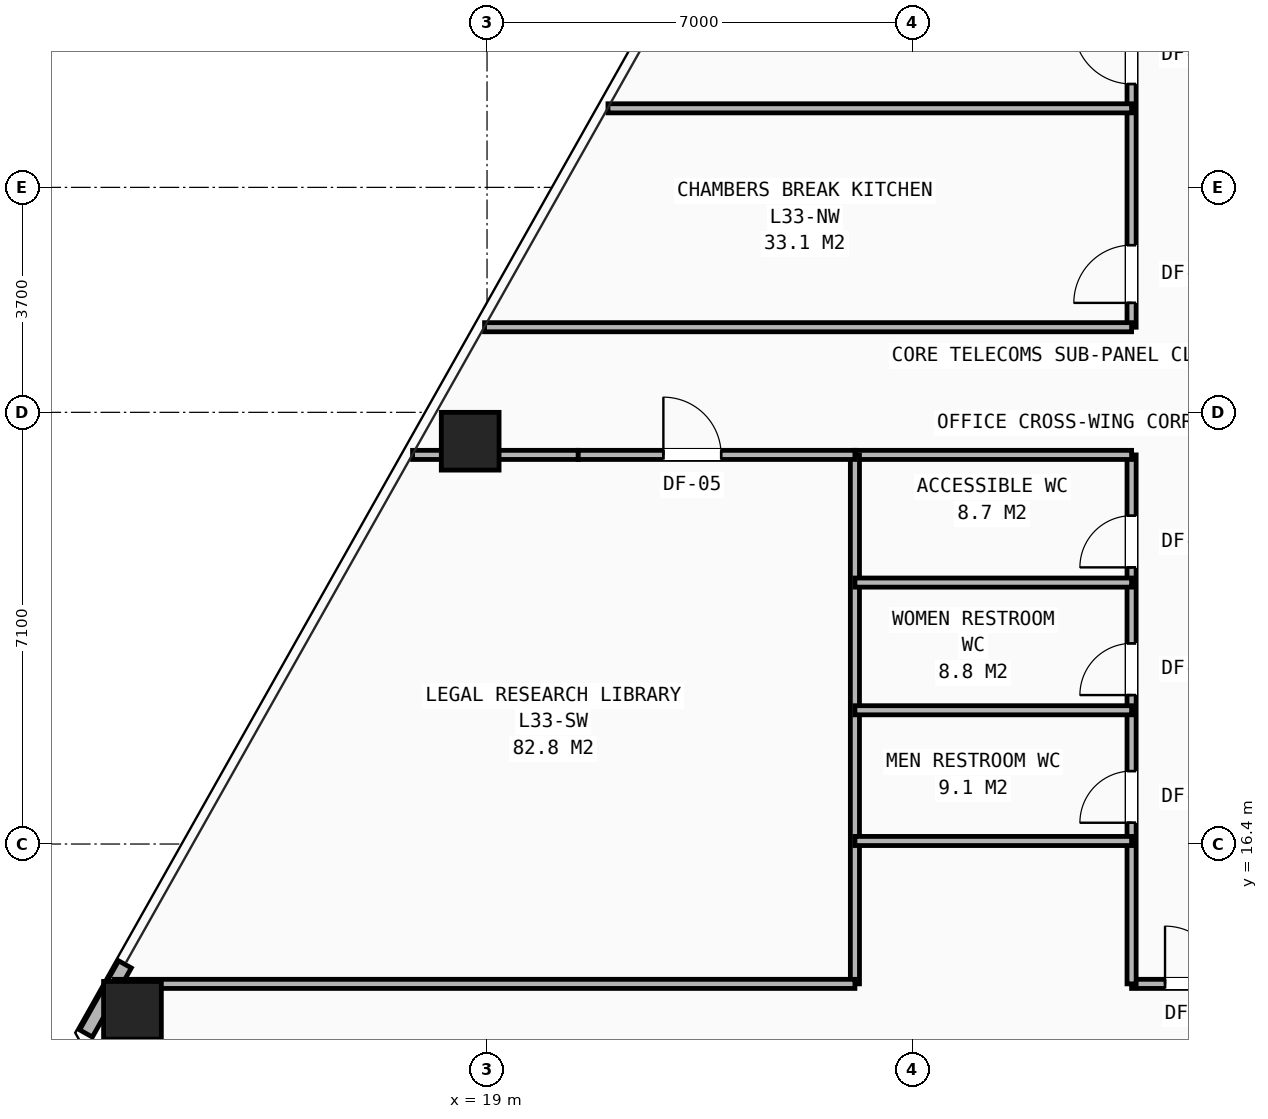
"""IFC4 building model, lengths in metres.
Left out: names, types, materials, properties, quantities, classifications, styles, units other than length and angle.
Written with IfcOpenShell. Run it as: python <this file> out.ifc"""

import sys

from ifc_helpers import new_model, si_unit, direction, frame, frame_2d, origin, origin_2d, place, context, subcontext, project, spatial, rectangle, hollow_rectangle, extrude, element, fill, save


model = new_model("IFC4")
c1 = context("Model", 3, precision=1e-05, world=origin(), true_north=direction((0.0, 1.0)))
c2 = subcontext(c1, "Body", "Model", "MODEL_VIEW")
j1 = project(units=[si_unit("LENGTHUNIT", "METRE"), si_unit("PLANEANGLEUNIT", "RADIAN")], contexts=[c1])
p1 = place(None, origin())
s1 = spatial("IfcSite", under=j1, at=p1, CompositionType="ELEMENT")
p2 = place(p1, origin())
s2 = spatial("IfcBuilding", under=s1, at=p2, CompositionType="ELEMENT")
p3 = place(p2, frame((0.0, 0.0, 116.0)))
s3 = spatial("IfcBuildingStorey", under=s2, at=p3, CompositionType="ELEMENT", Elevation=116.0)
for number, where, z_axis, x_axis in (
    (1, (18.723, 23.025, 0.0), (0.0, 0.0, 1.0), (1.0, 0.0, 0.0)),
    (2, (13.169, 13.665, 0.0), (0.0, 0.0, 1.0), (1.0, 0.0, 0.0)),
):
    element("IfcColumn", number, at=place(p3, frame(where, z_axis=z_axis, x_axis=x_axis)), inside=s3, PredefinedType="COLUMN", context=c2, shape_type="SweptSolid", body=[
        extrude(hollow_rectangle(XDim=0.95, YDim=0.95, WallThickness=0.065, at=origin_2d()), origin(), (0.0, 0.0, 1.0), 3.45),
    ])
p4 = place(p3, frame((13.045, 14.421, 0.0), z_axis=(0.0, 0.0, 1.0), x_axis=(-0.4912738615, -0.871005162446, 0.0)))
e3 = element("IfcWall", 3, at=p4, inside=s3, PredefinedType="SHEAR", context=c2, shape_type="SweptSolid", body=[
    extrude(rectangle(XDim=1.304, YDim=0.24, at=frame_2d((0.652, 0.0))), origin(), (0.0, 0.0, 1.0), 2.583),
])
p5 = place(p3, frame((29.6, 14.1, 0.0), z_axis=(0.0, 0.0, 1.0), x_axis=(1.0, 0.0, 0.0)))
e4 = element("IfcWall", 4, at=p5, inside=s3, PredefinedType="PARTITIONING", context=c2, shape_type="SweptSolid", body=[
    extrude(rectangle(XDim=18.6, YDim=0.15, at=frame_2d((9.3, 0.0))), origin(), (0.0, 0.0, 1.0), 2.225),
])
p6 = place(p5, frame((0.55, 0.0, 0.0)))
e5 = element("IfcOpeningElement", 5, at=p6, cuts=e4, PredefinedType="OPENING", context=c2, shape_type="SweptSolid", body=[
    extrude(rectangle(XDim=0.95, YDim=2.1, at=frame_2d((0.475, 1.05))), frame((0.0, 0.085, 0.0), z_axis=(0.0, -1.0, 0.0), x_axis=(1.0, 0.0, 0.0)), (0.0, 0.0, 1.0), 0.17),
])
p7 = place(p5, frame((3.95, 0.0, 0.0)))
e6 = element("IfcOpeningElement", 6, at=p7, cuts=e4, PredefinedType="OPENING", context=c2, shape_type="SweptSolid", body=[
    extrude(rectangle(XDim=0.95, YDim=2.1, at=frame_2d((0.475, 1.05))), frame((0.0, 0.085, 0.0), z_axis=(0.0, -1.0, 0.0), x_axis=(1.0, 0.0, 0.0)), (0.0, 0.0, 1.0), 0.17),
])
p8 = place(p5, frame((8.55, 0.0, 0.0)))
e7 = element("IfcOpeningElement", 7, at=p8, cuts=e4, PredefinedType="OPENING", context=c2, shape_type="SweptSolid", body=[
    extrude(rectangle(XDim=0.95, YDim=2.1, at=frame_2d((0.475, 1.05))), frame((0.0, 0.085, 0.0), z_axis=(0.0, -1.0, 0.0), x_axis=(1.0, 0.0, 0.0)), (0.0, 0.0, 1.0), 0.17),
])
p9 = place(p5, frame((13.35, 0.0, 0.0)))
e8 = element("IfcOpeningElement", 8, at=p9, cuts=e4, PredefinedType="OPENING", context=c2, shape_type="SweptSolid", body=[
    extrude(rectangle(XDim=0.95, YDim=2.1, at=frame_2d((0.475, 1.05))), frame((0.0, 0.085, 0.0), z_axis=(0.0, -1.0, 0.0), x_axis=(1.0, 0.0, 0.0)), (0.0, 0.0, 1.0), 0.17),
])
p10 = place(p3, frame((29.6, 14.1, 0.0), z_axis=(0.0, 0.0, 1.0), x_axis=(0.0, 1.0, 0.0)))
e9 = element("IfcWall", 9, at=p10, inside=s3, PredefinedType="PARTITIONING", context=c2, shape_type="SweptSolid", body=[
    extrude(rectangle(XDim=8.7, YDim=0.15, at=frame_2d((4.35, 0.0))), origin(), (0.0, 0.0, 1.0), 3.21),
])
p11 = place(p10, frame((2.65, 0.0, 0.0)))
e10 = element("IfcOpeningElement", 10, at=p11, cuts=e9, PredefinedType="OPENING", context=c2, shape_type="SweptSolid", body=[
    extrude(rectangle(XDim=0.85, YDim=2.05, at=frame_2d((0.425, 1.025))), frame((0.0, 0.085, 0.0), z_axis=(0.0, -1.0, 0.0), x_axis=(1.0, 0.0, 0.0)), (0.0, 0.0, 1.0), 0.17),
])
p12 = place(p10, frame((4.75, 0.0, 0.0)))
e11 = element("IfcOpeningElement", 11, at=p12, cuts=e9, PredefinedType="OPENING", context=c2, shape_type="SweptSolid", body=[
    extrude(rectangle(XDim=0.85, YDim=2.05, at=frame_2d((0.425, 1.025))), frame((0.0, 0.085, 0.0), z_axis=(0.0, -1.0, 0.0), x_axis=(1.0, 0.0, 0.0)), (0.0, 0.0, 1.0), 0.17),
])
p13 = place(p10, frame((6.85, 0.0, 0.0)))
e12 = element("IfcOpeningElement", 12, at=p13, cuts=e9, PredefinedType="OPENING", context=c2, shape_type="SweptSolid", body=[
    extrude(rectangle(XDim=0.85, YDim=2.05, at=frame_2d((0.425, 1.025))), frame((0.0, 0.085, 0.0), z_axis=(0.0, -1.0, 0.0), x_axis=(1.0, 0.0, 0.0)), (0.0, 0.0, 1.0), 0.17),
])
p14 = place(p3, frame((29.6, 24.9, 0.0), z_axis=(0.0, 0.0, 1.0), x_axis=(0.0, 1.0, 0.0)))
e13 = element("IfcWall", 13, at=p14, inside=s3, PredefinedType="PARTITIONING", context=c2, shape_type="SweptSolid", body=[
    extrude(rectangle(XDim=13.9, YDim=0.15, at=frame_2d((6.95, 0.0))), origin(), (0.0, 0.0, 1.0), 2.225),
])
p15 = place(p14, frame((0.4, 0.0, 0.0)))
e14 = element("IfcOpeningElement", 14, at=p15, cuts=e13, PredefinedType="OPENING", context=c2, shape_type="SweptSolid", body=[
    extrude(rectangle(XDim=0.95, YDim=2.1, at=frame_2d((0.475, 1.05))), frame((0.0, 0.085, 0.0), z_axis=(0.0, -1.0, 0.0), x_axis=(1.0, 0.0, 0.0)), (0.0, 0.0, 1.0), 0.17),
])
p16 = place(p14, frame((4.0, 0.0, 0.0)))
e15 = element("IfcOpeningElement", 15, at=p16, cuts=e13, PredefinedType="OPENING", context=c2, shape_type="SweptSolid", body=[
    extrude(rectangle(XDim=0.95, YDim=2.1, at=frame_2d((0.475, 1.05))), frame((0.0, 0.085, 0.0), z_axis=(0.0, -1.0, 0.0), x_axis=(1.0, 0.0, 0.0)), (0.0, 0.0, 1.0), 0.17),
])
p17 = place(p14, frame((9.5, 0.0, 0.0)))
e16 = element("IfcOpeningElement", 16, at=p17, cuts=e13, PredefinedType="OPENING", context=c2, shape_type="SweptSolid", body=[
    extrude(rectangle(XDim=0.95, YDim=2.1, at=frame_2d((0.475, 1.05))), frame((0.0, 0.085, 0.0), z_axis=(0.0, -1.0, 0.0), x_axis=(1.0, 0.0, 0.0)), (0.0, 0.0, 1.0), 0.17),
])
p18 = place(p3, frame((17.775, 22.8, 0.0), z_axis=(0.0, 0.0, 1.0), x_axis=(1.0, 0.0, 0.0)))
e17 = element("IfcWall", 17, at=p18, inside=s3, PredefinedType="PARTITIONING", context=c2, shape_type="SweptSolid", body=[
    extrude(rectangle(XDim=2.725, YDim=0.15, at=frame_2d((1.362, 0.0))), origin(), (0.0, 0.0, 1.0), 2.589),
])
p19 = place(p3, frame((25.05, 22.8, 0.0), z_axis=(0.0, 0.0, 1.0), x_axis=(1.0, 0.0, 0.0)))
e18 = element("IfcWall", 18, at=p19, inside=s3, PredefinedType="PARTITIONING", context=c2, shape_type="SweptSolid", body=[
    extrude(rectangle(XDim=4.55, YDim=0.15, at=frame_2d((2.275, 0.0))), origin(), (0.0, 0.0, 1.0), 3.21),
])
p20 = place(p3, frame((18.959, 24.9, 0.0), z_axis=(0.0, 0.0, 1.0), x_axis=(1.0, 0.0, 0.0)))
e19 = element("IfcWall", 19, at=p20, inside=s3, PredefinedType="PARTITIONING", context=c2, shape_type="SweptSolid", body=[
    extrude(rectangle(XDim=10.641, YDim=0.15, at=frame_2d((5.32, 0.0))), origin(), (0.0, 0.0, 1.0), 2.589),
])
p21 = place(p3, frame((25.05, 14.1, 0.0), z_axis=(0.0, 0.0, 1.0), x_axis=(0.0, 1.0, 0.0)))
e20 = element("IfcWall", 20, at=p21, inside=s3, PredefinedType="PARTITIONING", context=c2, shape_type="SweptSolid", body=[
    extrude(rectangle(XDim=8.7, YDim=0.15, at=frame_2d((4.35, 0.0))), origin(), (0.0, 0.0, 1.0), 3.21),
])
for number, where, z_axis, x_axis in (
    (21, (25.05, 16.45, 0.0), (0.0, 0.0, 1.0), (1.0, 0.0, 0.0)),
    (22, (25.05, 18.6, 0.0), (0.0, 0.0, 1.0), (1.0, 0.0, 0.0)),
    (23, (25.05, 20.7, 0.0), (0.0, 0.0, 1.0), (1.0, 0.0, 0.0)),
):
    element("IfcWall", number, at=place(p3, frame(where, z_axis=z_axis, x_axis=x_axis)), inside=s3, PredefinedType="PARTITIONING", context=c2, shape_type="SweptSolid", body=[
        extrude(rectangle(XDim=4.55, YDim=0.15, at=frame_2d((2.275, 0.0))), origin(), (0.0, 0.0, 1.0), 3.21),
    ])
p22 = place(p3, frame((12.87, 14.1, 0.0), z_axis=(0.0, 0.0, 1.0), x_axis=(1.0, 0.0, 0.0)))
e24 = element("IfcWall", 24, at=p22, inside=s3, PredefinedType="PARTITIONING", context=c2, shape_type="SweptSolid", body=[
    extrude(rectangle(XDim=12.18, YDim=0.15, at=frame_2d((6.09, 0.0))), origin(), (0.0, 0.0, 1.0), 2.225),
])
p23 = place(p3, frame((20.5, 22.8, 0.0), z_axis=(0.0, 0.0, 1.0), x_axis=(1.0, 0.0, 0.0)))
e25 = element("IfcWall", 25, at=p23, inside=s3, PredefinedType="PARTITIONING", context=c2, shape_type="SweptSolid", body=[
    extrude(rectangle(XDim=4.55, YDim=0.15, at=frame_2d((2.275, 0.0))), origin(), (0.0, 0.0, 1.0), 3.21),
])
p24 = place(p23, frame((1.4, 0.0, 0.0)))
e26 = element("IfcOpeningElement", 26, at=p24, cuts=e25, PredefinedType="OPENING", context=c2, shape_type="SweptSolid", body=[
    extrude(rectangle(XDim=0.95, YDim=2.1, at=frame_2d((0.475, 1.05))), frame((0.0, 0.085, 0.0), z_axis=(0.0, -1.0, 0.0), x_axis=(1.0, 0.0, 0.0)), (0.0, 0.0, 1.0), 0.17),
])
p25 = place(p3, frame((20.989, 28.5, 0.0), z_axis=(0.0, 0.0, 1.0), x_axis=(1.0, 0.0, 0.0)))
e27 = element("IfcWall", 27, at=p25, inside=s3, PredefinedType="PARTITIONING", context=c2, shape_type="SweptSolid", body=[
    extrude(rectangle(XDim=8.611, YDim=0.15, at=frame_2d((4.306, 0.0))), origin(), (0.0, 0.0, 1.0), 2.589),
])
p26 = place(p11, origin())
e28 = element("IfcDoor", 28, at=p26, inside=s3, OperationType="SINGLE_SWING_LEFT", PredefinedType="DOOR", context=c2, shape_type="SweptSolid", body=[
    extrude(rectangle(XDim=0.85, YDim=2.05, at=frame_2d((0.425, 1.025))), frame((0.0, 0.025, 0.0), z_axis=(0.0, -1.0, 0.0), x_axis=(1.0, 0.0, 0.0)), (0.0, 0.0, 1.0), 0.05),
])
fill(e10, e28)
p27 = place(p12, origin())
e29 = element("IfcDoor", 29, at=p27, inside=s3, OperationType="SINGLE_SWING_LEFT", PredefinedType="DOOR", context=c2, shape_type="SweptSolid", body=[
    extrude(rectangle(XDim=0.85, YDim=2.05, at=frame_2d((0.425, 1.025))), frame((0.0, 0.025, 0.0), z_axis=(0.0, -1.0, 0.0), x_axis=(1.0, 0.0, 0.0)), (0.0, 0.0, 1.0), 0.05),
])
fill(e11, e29)
p28 = place(p13, origin())
e30 = element("IfcDoor", 30, at=p28, inside=s3, OperationType="SINGLE_SWING_LEFT", PredefinedType="DOOR", context=c2, shape_type="SweptSolid", body=[
    extrude(rectangle(XDim=0.85, YDim=2.05, at=frame_2d((0.425, 1.025))), frame((0.0, 0.025, 0.0), z_axis=(0.0, -1.0, 0.0), x_axis=(1.0, 0.0, 0.0)), (0.0, 0.0, 1.0), 0.05),
])
fill(e12, e30)
p29 = place(p6, origin())
e31 = element("IfcDoor", 31, at=p29, inside=s3, OperationType="SINGLE_SWING_LEFT", PredefinedType="DOOR", context=c2, shape_type="SweptSolid", body=[
    extrude(rectangle(XDim=0.95, YDim=2.1, at=frame_2d((0.475, 1.05))), frame((0.0, 0.025, 0.0), z_axis=(0.0, -1.0, 0.0), x_axis=(1.0, 0.0, 0.0)), (0.0, 0.0, 1.0), 0.05),
])
fill(e5, e31)
p30 = place(p24, origin())
e32 = element("IfcDoor", 32, at=p30, inside=s3, OperationType="SINGLE_SWING_LEFT", PredefinedType="DOOR", context=c2, shape_type="SweptSolid", body=[
    extrude(rectangle(XDim=0.95, YDim=2.1, at=frame_2d((0.475, 1.05))), frame((0.0, 0.025, 0.0), z_axis=(0.0, -1.0, 0.0), x_axis=(1.0, 0.0, 0.0)), (0.0, 0.0, 1.0), 0.05),
])
fill(e26, e32)
p31 = place(p15, origin())
e33 = element("IfcDoor", 33, at=p31, inside=s3, OperationType="SINGLE_SWING_LEFT", PredefinedType="DOOR", context=c2, shape_type="SweptSolid", body=[
    extrude(rectangle(XDim=0.95, YDim=2.1, at=frame_2d((0.475, 1.05))), frame((0.0, 0.025, 0.0), z_axis=(0.0, -1.0, 0.0), x_axis=(1.0, 0.0, 0.0)), (0.0, 0.0, 1.0), 0.05),
])
fill(e14, e33)
p32 = place(p16, origin())
e34 = element("IfcDoor", 34, at=p32, inside=s3, OperationType="SINGLE_SWING_RIGHT", PredefinedType="DOOR", context=c2, shape_type="SweptSolid", body=[
    extrude(rectangle(XDim=0.95, YDim=2.1, at=frame_2d((0.475, 1.05))), frame((0.0, 0.025, 0.0), z_axis=(0.0, -1.0, 0.0), x_axis=(1.0, 0.0, 0.0)), (0.0, 0.0, 1.0), 0.05),
])
fill(e15, e34)
save(model, sys.argv[1])
